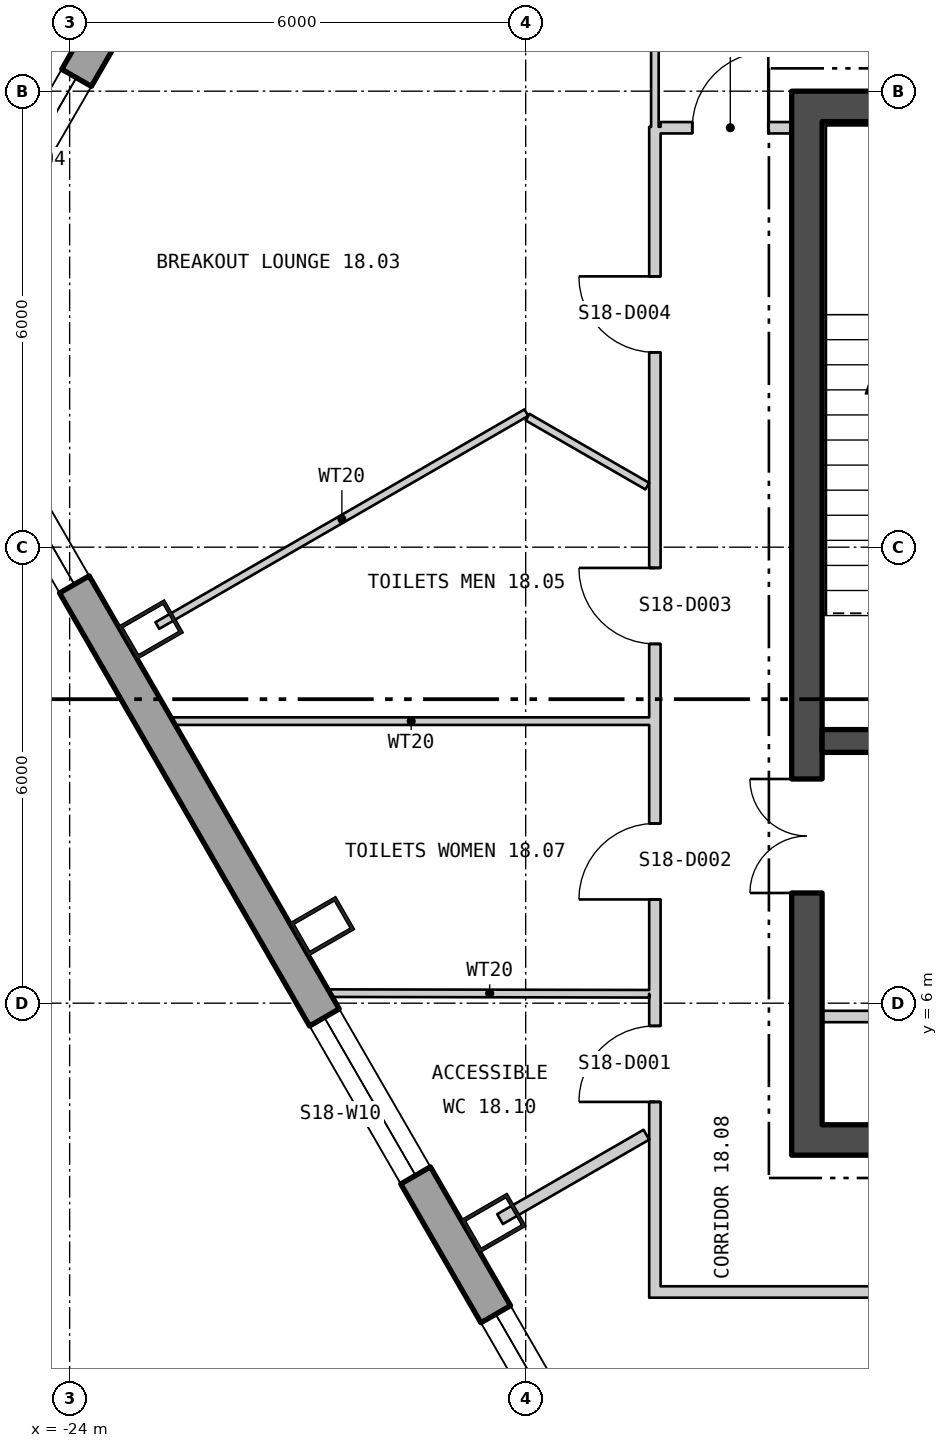
"""IFC4 building model, lengths in metres.
Left out: names, types, materials, properties, quantities, classifications, styles, units other than length and angle.
Written with IfcOpenShell. Run it as: python <this file> out.ifc"""

import sys

from ifc_helpers import new_model, si_unit, direction, frame, frame_2d, origin, origin_2d, place, context, subcontext, project, spatial, polyline, rectangle, hollow_rectangle, outline, extrude, element, fill, save


model = new_model("IFC4")
c1 = context("Model", 3, precision=1e-05, world=origin(), true_north=direction((0.0, 1.0)))
c2 = subcontext(c1, "Body", "Model", "MODEL_VIEW")
j1 = project(units=[si_unit("LENGTHUNIT", "METRE"), si_unit("PLANEANGLEUNIT", "RADIAN")], contexts=[c1])
p1 = place(None, origin())
s1 = spatial("IfcSite", under=j1, at=p1, CompositionType="ELEMENT")
p2 = place(p1, origin())
s2 = spatial("IfcBuilding", under=s1, at=p2, CompositionType="ELEMENT")
p3 = place(p2, frame((0.0, 0.0, 245.4)))
s3 = spatial("IfcBuildingStorey", under=s2, at=p3, CompositionType="ELEMENT", Elevation=245.4)
for number, where, z_axis, x_axis in (
    (1, (-22.932, 10.917, 0.0), (0.0, 0.0, 1.0), (0.5, -0.866, 0.0)),
    (2, (-20.678, 7.013, 0.0), (0.0, 0.0, 1.0), (0.5, -0.866, 0.0)),
    (3, (-18.423, 3.108, 0.0), (0.0, 0.0, 1.0), (0.5, -0.866, 0.0)),
):
    element("IfcColumn", number, at=place(p3, frame(where, z_axis=z_axis, x_axis=x_axis)), inside=s3, PredefinedType="COLUMN", context=c2, shape_type="SweptSolid", body=[
        extrude(hollow_rectangle(XDim=0.5, YDim=0.7, WallThickness=0.045, at=origin_2d()), origin(), (0.0, 0.0, 1.0), 3.9),
    ])
p4 = place(p3, frame((-22.871, 19.973, -0.4), z_axis=(0.0, 0.0, 1.0), x_axis=(-0.500001772576, -0.866024380385, 0.0)))
e4 = element("IfcWall", 4, at=p4, inside=s3, PredefinedType="SOLIDWALL", context=c2, shape_type="SweptSolid", body=[
    extrude(outline(polyline([(-0.13, -0.225), (6.08, -0.225), (5.82, 0.225), (0.13, 0.225), (-0.13, -0.225)])), origin(), (0.0, 0.0, 1.0), 3.9),
])
p5 = place(p4, frame((2.075, 0.0, 1.3)))
e5 = element("IfcOpeningElement", 5, at=p5, cuts=e4, PredefinedType="OPENING", context=c2, shape_type="SweptSolid", body=[
    extrude(rectangle(XDim=1.8, YDim=2.0, at=frame_2d((0.9, 1.0))), frame((0.0, 0.235, 0.0), z_axis=(0.0, -1.0, 0.0), x_axis=(1.0, 0.0, 0.0)), (0.0, 0.0, 1.0), 0.47),
])
p6 = place(p3, frame((-25.85, 14.822, -0.18), z_axis=(0.0, 0.0, 1.0), x_axis=(0.500000335318, -0.866025210188, 0.0)))
e6 = element("IfcWall", 6, at=p6, inside=s3, PredefinedType="SOLIDWALL", context=c2, shape_type="SweptSolid", body=[
    extrude(outline(polyline([(-0.13, -0.225), (45.88, -0.225), (45.62, 0.225), (0.13, 0.225), (-0.13, -0.225)])), origin(), (0.0, 0.0, 1.0), 3.68),
])
p7 = place(p6, frame((1.425, 0.0, 1.08)))
e7 = element("IfcOpeningElement", 7, at=p7, cuts=e6, PredefinedType="OPENING", context=c2, shape_type="SweptSolid", body=[
    extrude(rectangle(XDim=2.4, YDim=2.0, at=frame_2d((1.2, 1.0))), frame((0.0, 0.235, 0.0), z_axis=(0.0, -1.0, 0.0), x_axis=(1.0, 0.0, 0.0)), (0.0, 0.0, 1.0), 0.47),
])
p8 = place(p6, frame((10.403, 0.0, 1.08)))
e8 = element("IfcOpeningElement", 8, at=p8, cuts=e6, PredefinedType="OPENING", context=c2, shape_type="SweptSolid", body=[
    extrude(rectangle(XDim=2.4, YDim=2.0, at=frame_2d((1.2, 1.0))), frame((0.0, 0.235, 0.0), z_axis=(0.0, -1.0, 0.0), x_axis=(1.0, 0.0, 0.0)), (0.0, 0.0, 1.0), 0.47),
])
p9 = place(p6, frame((14.912, 0.0, 1.08)))
e9 = element("IfcOpeningElement", 9, at=p9, cuts=e6, PredefinedType="OPENING", context=c2, shape_type="SweptSolid", body=[
    extrude(rectangle(XDim=2.4, YDim=2.0, at=frame_2d((1.2, 1.0))), frame((0.0, 0.235, 0.0), z_axis=(0.0, -1.0, 0.0), x_axis=(1.0, 0.0, 0.0)), (0.0, 0.0, 1.0), 0.47),
])
p10 = place(p6, frame((19.421, 0.0, 1.08)))
e10 = element("IfcOpeningElement", 10, at=p10, cuts=e6, PredefinedType="OPENING", context=c2, shape_type="SweptSolid", body=[
    extrude(rectangle(XDim=2.4, YDim=2.0, at=frame_2d((1.2, 1.0))), frame((0.0, 0.235, 0.0), z_axis=(0.0, -1.0, 0.0), x_axis=(1.0, 0.0, 0.0)), (0.0, 0.0, 1.0), 0.47),
])
p11 = place(p6, frame((23.929, 0.0, 1.08)))
e11 = element("IfcOpeningElement", 11, at=p11, cuts=e6, PredefinedType="OPENING", context=c2, shape_type="SweptSolid", body=[
    extrude(rectangle(XDim=2.4, YDim=2.0, at=frame_2d((1.2, 1.0))), frame((0.0, 0.235, 0.0), z_axis=(0.0, -1.0, 0.0), x_axis=(1.0, 0.0, 0.0)), (0.0, 0.0, 1.0), 0.47),
])
p12 = place(p6, frame((28.438, 0.0, 1.08)))
e12 = element("IfcOpeningElement", 12, at=p12, cuts=e6, PredefinedType="OPENING", context=c2, shape_type="SweptSolid", body=[
    extrude(rectangle(XDim=2.4, YDim=2.0, at=frame_2d((1.2, 1.0))), frame((0.0, 0.235, 0.0), z_axis=(0.0, -1.0, 0.0), x_axis=(1.0, 0.0, 0.0)), (0.0, 0.0, 1.0), 0.47),
])
p13 = place(p6, frame((32.947, 0.0, 1.08)))
e13 = element("IfcOpeningElement", 13, at=p13, cuts=e6, PredefinedType="OPENING", context=c2, shape_type="SweptSolid", body=[
    extrude(rectangle(XDim=2.4, YDim=2.0, at=frame_2d((1.2, 1.0))), frame((0.0, 0.235, 0.0), z_axis=(0.0, -1.0, 0.0), x_axis=(1.0, 0.0, 0.0)), (0.0, 0.0, 1.0), 0.47),
])
p14 = place(p6, frame((37.455, 0.0, 1.08)))
e14 = element("IfcOpeningElement", 14, at=p14, cuts=e6, PredefinedType="OPENING", context=c2, shape_type="SweptSolid", body=[
    extrude(rectangle(XDim=2.4, YDim=2.0, at=frame_2d((1.2, 1.0))), frame((0.0, 0.235, 0.0), z_axis=(0.0, -1.0, 0.0), x_axis=(1.0, 0.0, 0.0)), (0.0, 0.0, 1.0), 0.47),
])
p15 = place(p6, frame((41.925, 0.0, 1.08)))
e15 = element("IfcOpeningElement", 15, at=p15, cuts=e6, PredefinedType="OPENING", context=c2, shape_type="SweptSolid", body=[
    extrude(rectangle(XDim=2.4, YDim=2.0, at=frame_2d((1.2, 1.0))), frame((0.0, 0.235, 0.0), z_axis=(0.0, -1.0, 0.0), x_axis=(1.0, 0.0, 0.0)), (0.0, 0.0, 1.0), 0.47),
])
p16 = place(p3, frame((-14.5, 4.2, 0.0), z_axis=(0.0, 0.0, 1.0), x_axis=(1.0, 0.0, 0.0)))
e16 = element("IfcWall", 16, at=p16, inside=s3, PredefinedType="SHEAR", context=c2, shape_type="SweptSolid", body=[
    extrude(rectangle(XDim=29.0, YDim=0.4, at=frame_2d((14.5, 0.0))), origin(), (0.0, 0.0, 1.0), 3.7),
])
p17 = place(p16, frame((9.0, 0.0, 0.0)))
e17 = element("IfcOpeningElement", 17, at=p17, cuts=e16, PredefinedType="OPENING", context=c2, shape_type="SweptSolid", body=[
    extrude(rectangle(XDim=1.8, YDim=2.4, at=frame_2d((0.9, 1.2))), frame((0.0, 0.21, 0.0), z_axis=(0.0, -1.0, 0.0), x_axis=(1.0, 0.0, 0.0)), (0.0, 0.0, 1.0), 0.42),
])
p18 = place(p16, frame((19.0, 0.0, 0.0)))
e18 = element("IfcOpeningElement", 18, at=p18, cuts=e16, PredefinedType="OPENING", context=c2, shape_type="SweptSolid", body=[
    extrude(rectangle(XDim=1.8, YDim=2.4, at=frame_2d((0.9, 1.2))), frame((0.0, 0.21, 0.0), z_axis=(0.0, -1.0, 0.0), x_axis=(1.0, 0.0, 0.0)), (0.0, 0.0, 1.0), 0.42),
])
p19 = place(p3, frame((-14.5, 17.8, 0.0), z_axis=(0.0, 0.0, 1.0), x_axis=(1.0, 0.0, 0.0)))
e19 = element("IfcWall", 19, at=p19, inside=s3, PredefinedType="SHEAR", context=c2, shape_type="SweptSolid", body=[
    extrude(rectangle(XDim=29.0, YDim=0.4, at=frame_2d((14.5, 0.0))), origin(), (0.0, 0.0, 1.0), 3.7),
])
p20 = place(p3, frame((-14.3, 4.4, 0.0), z_axis=(0.0, 0.0, 1.0), x_axis=(0.0, 1.0, 0.0)))
e20 = element("IfcWall", 20, at=p20, inside=s3, PredefinedType="SHEAR", context=c2, shape_type="SweptSolid", body=[
    extrude(rectangle(XDim=13.2, YDim=0.4, at=frame_2d((6.6, 0.0))), origin(), (0.0, 0.0, 1.0), 3.7),
])
p21 = place(p20, frame((3.05, 0.0, 0.0)))
e21 = element("IfcOpeningElement", 21, at=p21, cuts=e20, PredefinedType="OPENING", context=c2, shape_type="SweptSolid", body=[
    extrude(rectangle(XDim=1.5, YDim=2.1, at=frame_2d((0.75, 1.05))), frame((0.0, 0.21, 0.0), z_axis=(0.0, -1.0, 0.0), x_axis=(1.0, 0.0, 0.0)), (0.0, 0.0, 1.0), 0.42),
])
p22 = place(p3, frame((-14.1, 9.45, 0.0), z_axis=(0.0, 0.0, 1.0), x_axis=(1.0, 0.0, 0.0)))
e22 = element("IfcWall", 22, at=p22, inside=s3, PredefinedType="SHEAR", context=c2, shape_type="SweptSolid", body=[
    extrude(rectangle(XDim=3.1, YDim=0.3, at=frame_2d((1.55, 0.0))), origin(), (0.0, 0.0, 1.0), 3.7),
])
p23 = place(p22, frame((0.95, 0.0, 0.0)))
e23 = element("IfcOpeningElement", 23, at=p23, cuts=e22, PredefinedType="OPENING", context=c2, shape_type="SweptSolid", body=[
    extrude(rectangle(XDim=1.2, YDim=2.1, at=frame_2d((0.6, 1.05))), frame((0.0, 0.16, 0.0), z_axis=(0.0, -1.0, 0.0), x_axis=(1.0, 0.0, 0.0)), (0.0, 0.0, 1.0), 0.32),
])
p24 = place(p3, frame((-14.1, 5.825, 0.0), z_axis=(0.0, 0.0, 1.0), x_axis=(1.0, 0.0, 0.0)))
e24 = element("IfcWall", 24, at=p24, inside=s3, PredefinedType="PARTITIONING", context=c2, shape_type="SweptSolid", body=[
    extrude(rectangle(XDim=3.1, YDim=0.15, at=frame_2d((1.55, 0.0))), origin(), (0.0, 0.0, 1.0), 3.7),
])
p25 = place(p3, frame((-22.846, 10.969, 0.0), z_axis=(0.0, 0.0, 1.0), x_axis=(0.866182615826, 0.499727601839, 0.0)))
e25 = element("IfcWall", 25, at=p25, inside=s3, PredefinedType="PARTITIONING", context=c2, shape_type="SweptSolid", body=[
    extrude(rectangle(XDim=5.605, YDim=0.1, at=frame_2d((2.803, 0.0))), origin(), (0.0, 0.0, 1.0), 3.7),
])
p26 = place(p3, frame((-22.638, 9.711, 0.0), z_axis=(0.0, 0.0, 1.0), x_axis=(1.0, 0.0, 0.0)))
e26 = element("IfcWall", 26, at=p26, inside=s3, PredefinedType="PARTITIONING", context=c2, shape_type="SweptSolid", body=[
    extrude(rectangle(XDim=6.263, YDim=0.1, at=frame_2d((3.131, 0.0))), origin(), (0.0, 0.0, 1.0), 3.7),
])
p27 = place(p3, frame((-20.572, 6.132, 0.0), z_axis=(0.0, 0.0, 1.0), x_axis=(0.999998183352, -0.001906119959, 0.0)))
e27 = element("IfcWall", 27, at=p27, inside=s3, PredefinedType="PARTITIONING", context=c2, shape_type="SweptSolid", body=[
    extrude(rectangle(XDim=4.197, YDim=0.1, at=frame_2d((2.099, 0.0))), origin(), (0.0, 0.0, 1.0), 3.7),
])
p28 = place(p3, frame((-18.337, 3.159, 0.0), z_axis=(0.0, 0.0, 1.0), x_axis=(0.866297945504, 0.499527646498, 0.0)))
e28 = element("IfcWall", 28, at=p28, inside=s3, PredefinedType="PARTITIONING", context=c2, shape_type="SweptSolid", body=[
    extrude(rectangle(XDim=2.222, YDim=0.15, at=frame_2d((1.111, 0.0))), origin(), (0.0, 0.0, 1.0), 3.7),
])
p29 = place(p3, frame((-17.975, 13.711, 0.0), z_axis=(0.0, 0.0, 1.0), x_axis=(0.866341220787, -0.499452589508, 0.0)))
e29 = element("IfcWall", 29, at=p29, inside=s3, PredefinedType="PARTITIONING", context=c2, shape_type="SweptSolid", body=[
    extrude(rectangle(XDim=1.818, YDim=0.1, at=frame_2d((0.909, 0.0))), origin(), (0.0, 0.0, 1.0), 3.7),
])
p30 = place(p3, frame((-16.3, 2.125, 0.0), z_axis=(0.0, 0.0, 1.0), x_axis=(0.0, 1.0, 0.0)))
e30 = element("IfcWall", 30, at=p30, inside=s3, PredefinedType="PARTITIONING", context=c2, shape_type="SweptSolid", body=[
    extrude(rectangle(XDim=15.406, YDim=0.15, at=frame_2d((7.703, 0.0))), origin(), (0.0, 0.0, 1.0), 3.7),
])
p31 = place(p30, frame((2.576, 0.0, 0.0)))
e31 = element("IfcOpeningElement", 31, at=p31, cuts=e30, PredefinedType="OPENING", context=c2, shape_type="SweptSolid", body=[
    extrude(rectangle(XDim=1.0, YDim=2.1, at=frame_2d((0.5, 1.05))), frame((0.0, 0.085, 0.0), z_axis=(0.0, -1.0, 0.0), x_axis=(1.0, 0.0, 0.0)), (0.0, 0.0, 1.0), 0.17),
])
p32 = place(p30, frame((5.24, 0.0, 0.0)))
e32 = element("IfcOpeningElement", 32, at=p32, cuts=e30, PredefinedType="OPENING", context=c2, shape_type="SweptSolid", body=[
    extrude(rectangle(XDim=1.0, YDim=2.1, at=frame_2d((0.5, 1.05))), frame((0.0, 0.085, 0.0), z_axis=(0.0, -1.0, 0.0), x_axis=(1.0, 0.0, 0.0)), (0.0, 0.0, 1.0), 0.17),
])
p33 = place(p30, frame((8.602, 0.0, 0.0)))
e33 = element("IfcOpeningElement", 33, at=p33, cuts=e30, PredefinedType="OPENING", context=c2, shape_type="SweptSolid", body=[
    extrude(rectangle(XDim=1.0, YDim=2.1, at=frame_2d((0.5, 1.05))), frame((0.0, 0.085, 0.0), z_axis=(0.0, -1.0, 0.0), x_axis=(1.0, 0.0, 0.0)), (0.0, 0.0, 1.0), 0.17),
])
p34 = place(p30, frame((12.438, 0.0, 0.0)))
e34 = element("IfcOpeningElement", 34, at=p34, cuts=e30, PredefinedType="OPENING", context=c2, shape_type="SweptSolid", body=[
    extrude(rectangle(XDim=1.0, YDim=2.1, at=frame_2d((0.5, 1.05))), frame((0.0, 0.085, 0.0), z_axis=(0.0, -1.0, 0.0), x_axis=(1.0, 0.0, 0.0)), (0.0, 0.0, 1.0), 0.17),
])
p35 = place(p3, frame((-16.3, 17.531, 0.0), z_axis=(0.0, 0.0, 1.0), x_axis=(0.0, 1.0, 0.0)))
e35 = element("IfcWall", 35, at=p35, inside=s3, PredefinedType="PARTITIONING", context=c2, shape_type="SweptSolid", body=[
    extrude(rectangle(XDim=2.219, YDim=0.1, at=frame_2d((1.109, 0.0))), origin(), (0.0, 0.0, 1.0), 3.7),
])
p36 = place(p3, frame((-16.225, 2.2, 0.0), z_axis=(0.0, 0.0, 1.0), x_axis=(1.0, 0.0, 0.0)))
e36 = element("IfcWall", 36, at=p36, inside=s3, PredefinedType="PARTITIONING", context=c2, shape_type="SweptSolid", body=[
    extrude(rectangle(XDim=8.2, YDim=0.15, at=frame_2d((4.1, 0.0))), origin(), (0.0, 0.0, 1.0), 3.7),
])
p37 = place(p3, frame((-16.225, 17.519, 0.0), z_axis=(0.0, 0.0, 1.0), x_axis=(1.0, 0.0, 0.0)))
e37 = element("IfcWall", 37, at=p37, inside=s3, PredefinedType="PARTITIONING", context=c2, shape_type="SweptSolid", body=[
    extrude(rectangle(XDim=1.725, YDim=0.15, at=frame_2d((0.863, 0.0))), origin(), (0.0, 0.0, 1.0), 3.7),
])
p38 = place(p37, frame((0.417, 0.0, 0.0)))
e38 = element("IfcOpeningElement", 38, at=p38, cuts=e37, PredefinedType="OPENING", context=c2, shape_type="SweptSolid", body=[
    extrude(rectangle(XDim=1.0, YDim=2.1, at=frame_2d((0.5, 1.05))), frame((0.0, 0.085, 0.0), z_axis=(0.0, -1.0, 0.0), x_axis=(1.0, 0.0, 0.0)), (0.0, 0.0, 1.0), 0.17),
])
p39 = place(p5, origin())
e39 = element("IfcWindow", 39, at=p39, inside=s3, PartitioningType="SINGLE_PANEL", PredefinedType="WINDOW", context=c2, shape_type="SweptSolid", body=[
    extrude(rectangle(XDim=1.8, YDim=2.0, at=frame_2d((0.9, 1.0))), frame((0.0, 0.105, 0.0), z_axis=(0.0, -1.0, 0.0), x_axis=(1.0, 0.0, 0.0)), (0.0, 0.0, 1.0), 0.06),
])
fill(e5, e39)
p40 = place(p7, origin())
e40 = element("IfcWindow", 40, at=p40, inside=s3, PartitioningType="SINGLE_PANEL", PredefinedType="WINDOW", context=c2, shape_type="SweptSolid", body=[
    extrude(rectangle(XDim=2.4, YDim=2.0, at=frame_2d((1.2, 1.0))), frame((0.0, 0.105, 0.0), z_axis=(0.0, -1.0, 0.0), x_axis=(1.0, 0.0, 0.0)), (0.0, 0.0, 1.0), 0.06),
])
fill(e7, e40)
p41 = place(p8, origin())
e41 = element("IfcWindow", 41, at=p41, inside=s3, PartitioningType="SINGLE_PANEL", PredefinedType="WINDOW", context=c2, shape_type="SweptSolid", body=[
    extrude(rectangle(XDim=2.4, YDim=2.0, at=frame_2d((1.2, 1.0))), frame((0.0, 0.105, 0.0), z_axis=(0.0, -1.0, 0.0), x_axis=(1.0, 0.0, 0.0)), (0.0, 0.0, 1.0), 0.06),
])
fill(e8, e41)
p42 = place(p9, origin())
e42 = element("IfcWindow", 42, at=p42, inside=s3, PartitioningType="SINGLE_PANEL", PredefinedType="WINDOW", context=c2, shape_type="SweptSolid", body=[
    extrude(rectangle(XDim=2.4, YDim=2.0, at=frame_2d((1.2, 1.0))), frame((0.0, 0.105, 0.0), z_axis=(0.0, -1.0, 0.0), x_axis=(1.0, 0.0, 0.0)), (0.0, 0.0, 1.0), 0.06),
])
fill(e9, e42)
p43 = place(p21, origin())
e43 = element("IfcDoor", 43, at=p43, inside=s3, OperationType="DOUBLE_DOOR_SINGLE_SWING", PredefinedType="DOOR", context=c2, shape_type="SweptSolid", body=[
    extrude(rectangle(XDim=1.5, YDim=2.1, at=frame_2d((0.75, 1.05))), frame((0.0, 0.025, 0.0), z_axis=(0.0, -1.0, 0.0), x_axis=(1.0, 0.0, 0.0)), (0.0, 0.0, 1.0), 0.05),
])
fill(e21, e43)
p44 = place(p31, origin())
e44 = element("IfcDoor", 44, at=p44, inside=s3, OperationType="SINGLE_SWING_RIGHT", PredefinedType="DOOR", context=c2, shape_type="SweptSolid", body=[
    extrude(rectangle(XDim=1.0, YDim=2.1, at=frame_2d((0.5, 1.05))), frame((0.0, 0.025, 0.0), z_axis=(0.0, -1.0, 0.0), x_axis=(1.0, 0.0, 0.0)), (0.0, 0.0, 1.0), 0.05),
])
fill(e31, e44)
p45 = place(p32, origin())
e45 = element("IfcDoor", 45, at=p45, inside=s3, OperationType="SINGLE_SWING_RIGHT", PredefinedType="DOOR", context=c2, shape_type="SweptSolid", body=[
    extrude(rectangle(XDim=1.0, YDim=2.1, at=frame_2d((0.5, 1.05))), frame((0.0, 0.025, 0.0), z_axis=(0.0, -1.0, 0.0), x_axis=(1.0, 0.0, 0.0)), (0.0, 0.0, 1.0), 0.05),
])
fill(e32, e45)
p46 = place(p33, origin())
e46 = element("IfcDoor", 46, at=p46, inside=s3, OperationType="SINGLE_SWING_LEFT", PredefinedType="DOOR", context=c2, shape_type="SweptSolid", body=[
    extrude(rectangle(XDim=1.0, YDim=2.1, at=frame_2d((0.5, 1.05))), frame((0.0, 0.025, 0.0), z_axis=(0.0, -1.0, 0.0), x_axis=(1.0, 0.0, 0.0)), (0.0, 0.0, 1.0), 0.05),
])
fill(e33, e46)
p47 = place(p34, origin())
e47 = element("IfcDoor", 47, at=p47, inside=s3, OperationType="SINGLE_SWING_LEFT", PredefinedType="DOOR", context=c2, shape_type="SweptSolid", body=[
    extrude(rectangle(XDim=1.0, YDim=2.1, at=frame_2d((0.5, 1.05))), frame((0.0, 0.025, 0.0), z_axis=(0.0, -1.0, 0.0), x_axis=(1.0, 0.0, 0.0)), (0.0, 0.0, 1.0), 0.05),
])
fill(e34, e47)
p48 = place(p38, origin())
e48 = element("IfcDoor", 48, at=p48, inside=s3, OperationType="SINGLE_SWING_LEFT", PredefinedType="DOOR", context=c2, shape_type="SweptSolid", body=[
    extrude(rectangle(XDim=1.0, YDim=2.1, at=frame_2d((0.5, 1.05))), frame((0.0, 0.025, 0.0), z_axis=(0.0, -1.0, 0.0), x_axis=(1.0, 0.0, 0.0)), (0.0, 0.0, 1.0), 0.05),
])
fill(e38, e48)
save(model, sys.argv[1])
